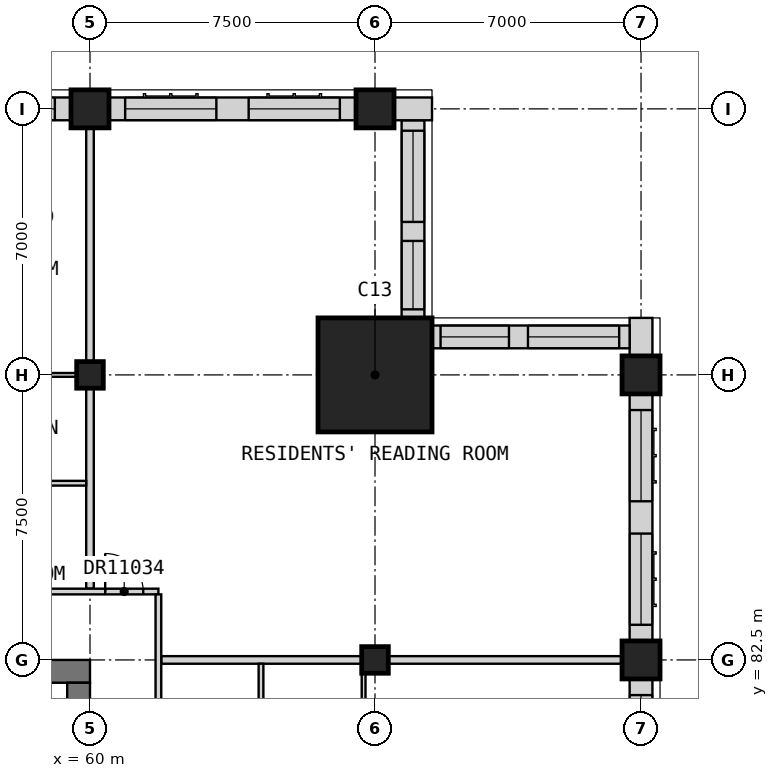
"""IFC4 building model, lengths in metres.
Left out: names, types, materials, properties, quantities, classifications, styles, units other than length and angle.
Written with IfcOpenShell. Run it as: python <this file> out.ifc"""

import sys

from ifc_helpers import new_model, si_unit, direction, frame, frame_2d, origin, origin_2d, place, context, subcontext, project, spatial, rectangle, extrude, element, fill, save


model = new_model("IFC4")
c1 = context("Model", 3, precision=1e-05, world=origin(), true_north=direction((0.0, 1.0)))
c2 = subcontext(c1, "Body", "Model", "MODEL_VIEW")
j1 = project(units=[si_unit("LENGTHUNIT", "METRE"), si_unit("PLANEANGLEUNIT", "RADIAN")], contexts=[c1])
p1 = place(None, origin())
s1 = spatial("IfcSite", under=j1, at=p1, CompositionType="ELEMENT")
p2 = place(p1, origin())
s2 = spatial("IfcBuilding", under=s1, at=p2, CompositionType="ELEMENT")
p3 = place(p2, frame((0.0, 0.0, 276.7)))
s3 = spatial("IfcBuildingStorey", under=s2, at=p3, CompositionType="ELEMENT", Elevation=276.7)
p4 = place(p3, frame((60.0, 90.0, 0.0), z_axis=(0.0, 0.0, 1.0), x_axis=(1.0, 0.0, 0.0)))
e1 = element("IfcColumn", 1, at=p4, inside=s3, PredefinedType="COLUMN", context=c2, shape_type="SweptSolid", body=[
    extrude(rectangle(XDim=0.7, YDim=0.7, at=origin_2d()), origin(), (0.0, 0.0, 1.0), 3.5),
])
p5 = place(p3, frame((60.0, 97.0, 0.0), z_axis=(0.0, 0.0, 1.0), x_axis=(1.0, 0.0, 0.0)))
e2 = element("IfcColumn", 2, at=p5, inside=s3, PredefinedType="COLUMN", context=c2, shape_type="SweptSolid", body=[
    extrude(rectangle(XDim=1.0, YDim=1.0, at=origin_2d()), origin(), (0.0, 0.0, 1.0), 3.5),
])
p6 = place(p3, frame((67.5, 82.5, 0.0), z_axis=(0.0, 0.0, 1.0), x_axis=(1.0, 0.0, 0.0)))
e3 = element("IfcColumn", 3, at=p6, inside=s3, PredefinedType="COLUMN", context=c2, shape_type="SweptSolid", body=[
    extrude(rectangle(XDim=0.7, YDim=0.7, at=origin_2d()), origin(), (0.0, 0.0, 1.0), 3.5),
])
for number, where, z_axis, x_axis in (
    (4, (67.5, 97.0, 0.0), (0.0, 0.0, 1.0), (1.0, 0.0, 0.0)),
    (5, (74.5, 82.5, 0.0), (0.0, 0.0, 1.0), (1.0, 0.0, 0.0)),
    (6, (74.5, 90.0, 0.0), (0.0, 0.0, 1.0), (1.0, 0.0, 0.0)),
):
    element("IfcColumn", number, at=place(p3, frame(where, z_axis=z_axis, x_axis=x_axis)), inside=s3, PredefinedType="COLUMN", context=c2, shape_type="SweptSolid", body=[
        extrude(rectangle(XDim=1.0, YDim=1.0, at=origin_2d()), origin(), (0.0, 0.0, 1.0), 3.5),
    ])
p7 = place(p3, frame((67.5, 90.0, 0.0), z_axis=(0.0, 0.0, 1.0), x_axis=(1.0, 0.0, 0.0)))
e7 = element("IfcColumn", 7, at=p7, inside=s3, PredefinedType="COLUMN", context=c2, shape_type="SweptSolid", body=[
    extrude(rectangle(XDim=3.0, YDim=3.0, at=origin_2d()), origin(), (0.0, 0.0, 1.0), 3.5),
])
p8 = place(p3, frame((30.0, 82.2, 0.0), z_axis=(0.0, 0.0, 1.0), x_axis=(1.0, 0.0, 0.0)))
e8 = element("IfcWall", 8, at=p8, inside=s3, PredefinedType="SHEAR", context=c2, shape_type="SweptSolid", body=[
    extrude(rectangle(XDim=30.0, YDim=0.6, at=frame_2d((15.0, 0.0))), origin(), (0.0, 0.0, 1.0), 3.5),
])
p9 = place(p3, frame((59.7, 60.6, 0.0), z_axis=(0.0, 0.0, 1.0), x_axis=(0.0, 1.0, 0.0)))
e9 = element("IfcWall", 9, at=p9, inside=s3, PredefinedType="SHEAR", context=c2, shape_type="SweptSolid", body=[
    extrude(rectangle(XDim=21.3, YDim=0.6, at=frame_2d((10.65, 0.0))), origin(), (0.0, 0.0, 1.0), 3.5),
])
p10 = place(p9, frame((14.9, 0.0, 0.0)))
e10 = element("IfcOpeningElement", 10, at=p10, cuts=e9, PredefinedType="OPENING", context=c2, shape_type="SweptSolid", body=[
    extrude(rectangle(XDim=1.8, YDim=2.1, at=frame_2d((0.9, 1.05))), frame((0.0, 0.31, 0.0), z_axis=(0.0, -1.0, 0.0), x_axis=(1.0, 0.0, 0.0)), (0.0, 0.0, 1.0), 0.62),
])
p11 = place(p3, frame((74.5, 75.5, 0.0), z_axis=(0.0, 0.0, 1.0), x_axis=(0.0, 1.0, 0.0)))
e11 = element("IfcWall", 11, at=p11, inside=s3, PredefinedType="SOLIDWALL", context=c2, shape_type="SweptSolid", body=[
    extrude(rectangle(XDim=6.5, YDim=0.6, at=frame_2d((3.25, 0.0))), origin(), (0.0, 0.0, 1.0), 2.75),
])
p12 = place(p11, frame((0.425, 0.0, 0.8)))
e12 = element("IfcOpeningElement", 12, at=p12, cuts=e11, PredefinedType="OPENING", context=c2, shape_type="SweptSolid", body=[
    extrude(rectangle(XDim=2.4, YDim=1.8, at=frame_2d((1.2, 0.9))), frame((0.0, 0.31, 0.0), z_axis=(0.0, -1.0, 0.0), x_axis=(1.0, 0.0, 0.0)), (0.0, 0.0, 1.0), 0.62),
])
p13 = place(p11, frame((3.675, 0.0, 0.8)))
e13 = element("IfcOpeningElement", 13, at=p13, cuts=e11, PredefinedType="OPENING", context=c2, shape_type="SweptSolid", body=[
    extrude(rectangle(XDim=2.4, YDim=1.8, at=frame_2d((1.2, 0.9))), frame((0.0, 0.31, 0.0), z_axis=(0.0, -1.0, 0.0), x_axis=(1.0, 0.0, 0.0)), (0.0, 0.0, 1.0), 0.62),
])
p14 = place(p3, frame((74.5, 83.0, 0.0), z_axis=(0.0, 0.0, 1.0), x_axis=(0.0, 1.0, 0.0)))
e14 = element("IfcWall", 14, at=p14, inside=s3, PredefinedType="SOLIDWALL", context=c2, shape_type="SweptSolid", body=[
    extrude(rectangle(XDim=6.5, YDim=0.6, at=frame_2d((3.25, 0.0))), origin(), (0.0, 0.0, 1.0), 2.75),
])
p15 = place(p14, frame((0.425, 0.0, 0.8)))
e15 = element("IfcOpeningElement", 15, at=p15, cuts=e14, PredefinedType="OPENING", context=c2, shape_type="SweptSolid", body=[
    extrude(rectangle(XDim=2.4, YDim=1.8, at=frame_2d((1.2, 0.9))), frame((0.0, 0.31, 0.0), z_axis=(0.0, -1.0, 0.0), x_axis=(1.0, 0.0, 0.0)), (0.0, 0.0, 1.0), 0.62),
])
p16 = place(p14, frame((3.675, 0.0, 0.8)))
e16 = element("IfcOpeningElement", 16, at=p16, cuts=e14, PredefinedType="OPENING", context=c2, shape_type="SweptSolid", body=[
    extrude(rectangle(XDim=2.4, YDim=1.8, at=frame_2d((1.2, 0.9))), frame((0.0, 0.31, 0.0), z_axis=(0.0, -1.0, 0.0), x_axis=(1.0, 0.0, 0.0)), (0.0, 0.0, 1.0), 0.62),
])
p17 = place(p3, frame((74.5, 90.5, 0.0), z_axis=(0.0, 0.0, 1.0), x_axis=(0.0, 1.0, 0.0)))
e17 = element("IfcWall", 17, at=p17, inside=s3, PredefinedType="SOLIDWALL", context=c2, shape_type="SweptSolid", body=[
    extrude(rectangle(XDim=1.0, YDim=0.6, at=frame_2d((0.5, 0.0))), origin(), (0.0, 0.0, 1.0), 3.25),
])
p18 = place(p3, frame((74.2, 91.0, 0.0), z_axis=(0.0, 0.0, 1.0), x_axis=(-1.0, 0.0, 0.0)))
e18 = element("IfcWall", 18, at=p18, inside=s3, PredefinedType="SOLIDWALL", context=c2, shape_type="SweptSolid", body=[
    extrude(rectangle(XDim=5.2, YDim=0.6, at=frame_2d((2.6, 0.0))), origin(), (0.0, 0.0, 1.0), 3.25),
])
p19 = place(p18, frame((3.175, 0.0, 0.8)))
e19 = element("IfcOpeningElement", 19, at=p19, cuts=e18, PredefinedType="OPENING", context=c2, shape_type="SweptSolid", body=[
    extrude(rectangle(XDim=1.8, YDim=1.8, at=frame_2d((0.9, 0.9))), frame((0.0, 0.31, 0.0), z_axis=(0.0, -1.0, 0.0), x_axis=(1.0, 0.0, 0.0)), (0.0, 0.0, 1.0), 0.62),
])
p20 = place(p18, frame((0.275, 0.0, 0.8)))
e20 = element("IfcOpeningElement", 20, at=p20, cuts=e18, PredefinedType="OPENING", context=c2, shape_type="SweptSolid", body=[
    extrude(rectangle(XDim=2.4, YDim=1.8, at=frame_2d((1.2, 0.9))), frame((0.0, 0.31, 0.0), z_axis=(0.0, -1.0, 0.0), x_axis=(1.0, 0.0, 0.0)), (0.0, 0.0, 1.0), 0.62),
])
p21 = place(p3, frame((68.5, 91.5, 0.0), z_axis=(0.0, 0.0, 1.0), x_axis=(0.0, 1.0, 0.0)))
e21 = element("IfcWall", 21, at=p21, inside=s3, PredefinedType="SOLIDWALL", context=c2, shape_type="SweptSolid", body=[
    extrude(rectangle(XDim=5.2, YDim=0.6, at=frame_2d((2.6, 0.0))), origin(), (0.0, 0.0, 1.0), 3.25),
])
p22 = place(p21, frame((0.225, 0.0, 0.8)))
e22 = element("IfcOpeningElement", 22, at=p22, cuts=e21, PredefinedType="OPENING", context=c2, shape_type="SweptSolid", body=[
    extrude(rectangle(XDim=1.8, YDim=1.8, at=frame_2d((0.9, 0.9))), frame((0.0, 0.31, 0.0), z_axis=(0.0, -1.0, 0.0), x_axis=(1.0, 0.0, 0.0)), (0.0, 0.0, 1.0), 0.62),
])
p23 = place(p21, frame((2.525, 0.0, 0.8)))
e23 = element("IfcOpeningElement", 23, at=p23, cuts=e21, PredefinedType="OPENING", context=c2, shape_type="SweptSolid", body=[
    extrude(rectangle(XDim=2.4, YDim=1.8, at=frame_2d((1.2, 0.9))), frame((0.0, 0.31, 0.0), z_axis=(0.0, -1.0, 0.0), x_axis=(1.0, 0.0, 0.0)), (0.0, 0.0, 1.0), 0.62),
])
p24 = place(p3, frame((69.0, 97.0, 0.0), z_axis=(0.0, 0.0, 1.0), x_axis=(-1.0, 0.0, 0.0)))
e24 = element("IfcWall", 24, at=p24, inside=s3, PredefinedType="SOLIDWALL", context=c2, shape_type="SweptSolid", body=[
    extrude(rectangle(XDim=1.0, YDim=0.6, at=frame_2d((0.5, 0.0))), origin(), (0.0, 0.0, 1.0), 3.25),
])
p25 = place(p3, frame((67.0, 97.0, 0.0), z_axis=(0.0, 0.0, 1.0), x_axis=(-1.0, 0.0, 0.0)))
e25 = element("IfcWall", 25, at=p25, inside=s3, PredefinedType="SOLIDWALL", context=c2, shape_type="SweptSolid", body=[
    extrude(rectangle(XDim=6.5, YDim=0.6, at=frame_2d((3.25, 0.0))), origin(), (0.0, 0.0, 1.0), 2.75),
])
p26 = place(p25, frame((3.675, 0.0, 0.8)))
e26 = element("IfcOpeningElement", 26, at=p26, cuts=e25, PredefinedType="OPENING", context=c2, shape_type="SweptSolid", body=[
    extrude(rectangle(XDim=2.4, YDim=1.8, at=frame_2d((1.2, 0.9))), frame((0.0, 0.31, 0.0), z_axis=(0.0, -1.0, 0.0), x_axis=(1.0, 0.0, 0.0)), (0.0, 0.0, 1.0), 0.62),
])
p27 = place(p25, frame((0.425, 0.0, 0.8)))
e27 = element("IfcOpeningElement", 27, at=p27, cuts=e25, PredefinedType="OPENING", context=c2, shape_type="SweptSolid", body=[
    extrude(rectangle(XDim=2.4, YDim=1.8, at=frame_2d((1.2, 0.9))), frame((0.0, 0.31, 0.0), z_axis=(0.0, -1.0, 0.0), x_axis=(1.0, 0.0, 0.0)), (0.0, 0.0, 1.0), 0.62),
])
p28 = place(p3, frame((59.5, 97.0, 0.0), z_axis=(0.0, 0.0, 1.0), x_axis=(-1.0, 0.0, 0.0)))
e28 = element("IfcWall", 28, at=p28, inside=s3, PredefinedType="SOLIDWALL", context=c2, shape_type="SweptSolid", body=[
    extrude(rectangle(XDim=6.5, YDim=0.6, at=frame_2d((3.25, 0.0))), origin(), (0.0, 0.0, 1.0), 2.75),
])
p29 = place(p28, frame((3.675, 0.0, 0.8)))
e29 = element("IfcOpeningElement", 29, at=p29, cuts=e28, PredefinedType="OPENING", context=c2, shape_type="SweptSolid", body=[
    extrude(rectangle(XDim=2.4, YDim=1.8, at=frame_2d((1.2, 0.9))), frame((0.0, 0.31, 0.0), z_axis=(0.0, -1.0, 0.0), x_axis=(1.0, 0.0, 0.0)), (0.0, 0.0, 1.0), 0.62),
])
p30 = place(p28, frame((0.425, 0.0, 0.8)))
e30 = element("IfcOpeningElement", 30, at=p30, cuts=e28, PredefinedType="OPENING", context=c2, shape_type="SweptSolid", body=[
    extrude(rectangle(XDim=2.4, YDim=1.8, at=frame_2d((1.2, 0.9))), frame((0.0, 0.31, 0.0), z_axis=(0.0, -1.0, 0.0), x_axis=(1.0, 0.0, 0.0)), (0.0, 0.0, 1.0), 0.62),
])
for number, where, z_axis, x_axis in (
    (31, (61.875, 82.5, 0.0), (0.0, 0.0, 1.0), (1.0, 0.0, 0.0)),
    (32, (60.0, 84.375, 0.0), (0.0, 0.0, 1.0), (0.0, 1.0, 0.0)),
):
    element("IfcWall", number, at=place(p3, frame(where, z_axis=z_axis, x_axis=x_axis)), inside=s3, PredefinedType="PARTITIONING", context=c2, shape_type="SweptSolid", body=[
        extrude(rectangle(XDim=13.125, YDim=0.2, at=frame_2d((6.562, 0.0))), origin(), (0.0, 0.0, 1.0), 3.25),
    ])
p31 = place(p3, frame((33.75, 84.3, 0.0), z_axis=(0.0, 0.0, 1.0), x_axis=(1.0, 0.0, 0.0)))
e33 = element("IfcWall", 33, at=p31, inside=s3, PredefinedType="PARTITIONING", context=c2, shape_type="SweptSolid", body=[
    extrude(rectangle(XDim=28.05, YDim=0.15, at=frame_2d((14.025, 0.0))), origin(), (0.0, 0.0, 1.0), 3.25),
])
p32 = place(p31, frame((1.375, 0.0, 0.0)))
e34 = element("IfcOpeningElement", 34, at=p32, cuts=e33, PredefinedType="OPENING", context=c2, shape_type="SweptSolid", body=[
    extrude(rectangle(XDim=1.0, YDim=2.1, at=frame_2d((0.5, 1.05))), frame((0.0, 0.085, 0.0), z_axis=(0.0, -1.0, 0.0), x_axis=(1.0, 0.0, 0.0)), (0.0, 0.0, 1.0), 0.17),
])
p33 = place(p31, frame((8.925, 0.0, 0.0)))
e35 = element("IfcOpeningElement", 35, at=p33, cuts=e33, PredefinedType="OPENING", context=c2, shape_type="SweptSolid", body=[
    extrude(rectangle(XDim=0.9, YDim=2.1, at=frame_2d((0.45, 1.05))), frame((0.0, 0.085, 0.0), z_axis=(0.0, -1.0, 0.0), x_axis=(1.0, 0.0, 0.0)), (0.0, 0.0, 1.0), 0.17),
])
p34 = place(p31, frame((20.175, 0.0, 0.0)))
e36 = element("IfcOpeningElement", 36, at=p34, cuts=e33, PredefinedType="OPENING", context=c2, shape_type="SweptSolid", body=[
    extrude(rectangle(XDim=0.9, YDim=2.1, at=frame_2d((0.45, 1.05))), frame((0.0, 0.085, 0.0), z_axis=(0.0, -1.0, 0.0), x_axis=(1.0, 0.0, 0.0)), (0.0, 0.0, 1.0), 0.17),
])
p35 = place(p31, frame((26.65, 0.0, 0.0)))
e37 = element("IfcOpeningElement", 37, at=p35, cuts=e33, PredefinedType="OPENING", context=c2, shape_type="SweptSolid", body=[
    extrude(rectangle(XDim=1.0, YDim=2.1, at=frame_2d((0.5, 1.05))), frame((0.0, 0.085, 0.0), z_axis=(0.0, -1.0, 0.0), x_axis=(1.0, 0.0, 0.0)), (0.0, 0.0, 1.0), 0.17),
])
p36 = place(p3, frame((61.8, 58.275, 0.0), z_axis=(0.0, 0.0, 1.0), x_axis=(0.0, 1.0, 0.0)))
e38 = element("IfcWall", 38, at=p36, inside=s3, PredefinedType="PARTITIONING", context=c2, shape_type="SweptSolid", body=[
    extrude(rectangle(XDim=25.95, YDim=0.15, at=frame_2d((12.975, 0.0))), origin(), (0.0, 0.0, 1.0), 3.25),
])
p37 = place(p36, frame((3.15, 0.0, 0.0)))
e39 = element("IfcOpeningElement", 39, at=p37, cuts=e38, PredefinedType="OPENING", context=c2, shape_type="SweptSolid", body=[
    extrude(rectangle(XDim=0.9, YDim=2.1, at=frame_2d((0.45, 1.05))), frame((0.0, 0.085, 0.0), z_axis=(0.0, -1.0, 0.0), x_axis=(1.0, 0.0, 0.0)), (0.0, 0.0, 1.0), 0.17),
])
p38 = place(p36, frame((10.65, 0.0, 0.0)))
e40 = element("IfcOpeningElement", 40, at=p38, cuts=e38, PredefinedType="OPENING", context=c2, shape_type="SweptSolid", body=[
    extrude(rectangle(XDim=0.9, YDim=2.1, at=frame_2d((0.45, 1.05))), frame((0.0, 0.085, 0.0), z_axis=(0.0, -1.0, 0.0), x_axis=(1.0, 0.0, 0.0)), (0.0, 0.0, 1.0), 0.17),
])
p39 = place(p36, frame((18.15, 0.0, 0.0)))
e41 = element("IfcOpeningElement", 41, at=p39, cuts=e38, PredefinedType="OPENING", context=c2, shape_type="SweptSolid", body=[
    extrude(rectangle(XDim=0.9, YDim=2.1, at=frame_2d((0.45, 1.05))), frame((0.0, 0.085, 0.0), z_axis=(0.0, -1.0, 0.0), x_axis=(1.0, 0.0, 0.0)), (0.0, 0.0, 1.0), 0.17),
])
p40 = place(p3, frame((37.6, 90.0, 0.0), z_axis=(0.0, 0.0, 1.0), x_axis=(1.0, 0.0, 0.0)))
e42 = element("IfcWall", 42, at=p40, inside=s3, PredefinedType="PARTITIONING", context=c2, shape_type="SweptSolid", body=[
    extrude(rectangle(XDim=22.3, YDim=0.1, at=frame_2d((11.15, 0.0))), origin(), (0.0, 0.0, 1.0), 3.25),
])
p41 = place(p40, frame((1.475, 0.0, 0.0)))
e43 = element("IfcOpeningElement", 43, at=p41, cuts=e42, PredefinedType="OPENING", context=c2, shape_type="SweptSolid", body=[
    extrude(rectangle(XDim=0.9, YDim=2.1, at=frame_2d((0.45, 1.05))), frame((0.0, 0.06, 0.0), z_axis=(0.0, -1.0, 0.0), x_axis=(1.0, 0.0, 0.0)), (0.0, 0.0, 1.0), 0.12),
])
p42 = place(p40, frame((5.075, 0.0, 0.0)))
e44 = element("IfcOpeningElement", 44, at=p42, cuts=e42, PredefinedType="OPENING", context=c2, shape_type="SweptSolid", body=[
    extrude(rectangle(XDim=0.9, YDim=2.1, at=frame_2d((0.45, 1.05))), frame((0.0, 0.06, 0.0), z_axis=(0.0, -1.0, 0.0), x_axis=(1.0, 0.0, 0.0)), (0.0, 0.0, 1.0), 0.12),
])
p43 = place(p40, frame((12.575, 0.0, 0.0)))
e45 = element("IfcOpeningElement", 45, at=p43, cuts=e42, PredefinedType="OPENING", context=c2, shape_type="SweptSolid", body=[
    extrude(rectangle(XDim=0.9, YDim=2.1, at=frame_2d((0.45, 1.05))), frame((0.0, 0.06, 0.0), z_axis=(0.0, -1.0, 0.0), x_axis=(1.0, 0.0, 0.0)), (0.0, 0.0, 1.0), 0.12),
])
p44 = place(p40, frame((16.325, 0.0, 0.0)))
e46 = element("IfcOpeningElement", 46, at=p44, cuts=e42, PredefinedType="OPENING", context=c2, shape_type="SweptSolid", body=[
    extrude(rectangle(XDim=0.9, YDim=2.1, at=frame_2d((0.45, 1.05))), frame((0.0, 0.06, 0.0), z_axis=(0.0, -1.0, 0.0), x_axis=(1.0, 0.0, 0.0)), (0.0, 0.0, 1.0), 0.12),
])
p45 = place(p3, frame((67.2, 60.1, 0.0), z_axis=(0.0, 0.0, 1.0), x_axis=(0.0, 1.0, 0.0)))
e47 = element("IfcWall", 47, at=p45, inside=s3, PredefinedType="PARTITIONING", context=c2, shape_type="SweptSolid", body=[
    extrude(rectangle(XDim=22.3, YDim=0.1, at=frame_2d((11.15, 0.0))), origin(), (0.0, 0.0, 1.0), 3.25),
])
p46 = place(p45, frame((1.325, 0.0, 0.0)))
e48 = element("IfcOpeningElement", 48, at=p46, cuts=e47, PredefinedType="OPENING", context=c2, shape_type="SweptSolid", body=[
    extrude(rectangle(XDim=0.9, YDim=2.1, at=frame_2d((0.45, 1.05))), frame((0.0, 0.06, 0.0), z_axis=(0.0, -1.0, 0.0), x_axis=(1.0, 0.0, 0.0)), (0.0, 0.0, 1.0), 0.12),
])
p47 = place(p45, frame((8.825, 0.0, 0.0)))
e49 = element("IfcOpeningElement", 49, at=p47, cuts=e47, PredefinedType="OPENING", context=c2, shape_type="SweptSolid", body=[
    extrude(rectangle(XDim=0.9, YDim=2.1, at=frame_2d((0.45, 1.05))), frame((0.0, 0.06, 0.0), z_axis=(0.0, -1.0, 0.0), x_axis=(1.0, 0.0, 0.0)), (0.0, 0.0, 1.0), 0.12),
])
p48 = place(p45, frame((16.325, 0.0, 0.0)))
e50 = element("IfcOpeningElement", 50, at=p48, cuts=e47, PredefinedType="OPENING", context=c2, shape_type="SweptSolid", body=[
    extrude(rectangle(XDim=0.9, YDim=2.1, at=frame_2d((0.45, 1.05))), frame((0.0, 0.06, 0.0), z_axis=(0.0, -1.0, 0.0), x_axis=(1.0, 0.0, 0.0)), (0.0, 0.0, 1.0), 0.12),
])
p49 = place(p3, frame((56.25, 87.15, 0.0), z_axis=(0.0, 0.0, 1.0), x_axis=(1.0, 0.0, 0.0)))
e51 = element("IfcWall", 51, at=p49, inside=s3, PredefinedType="PARTITIONING", context=c2, shape_type="SweptSolid", body=[
    extrude(rectangle(XDim=3.65, YDim=0.125, at=frame_2d((1.825, 0.0))), origin(), (0.0, 0.0, 1.0), 3.25),
])
p50 = place(p3, frame((64.5, 78.812, 0.0), z_axis=(0.0, 0.0, 1.0), x_axis=(0.0, 1.0, 0.0)))
e52 = element("IfcWall", 52, at=p50, inside=s3, PredefinedType="PARTITIONING", context=c2, shape_type="SweptSolid", body=[
    extrude(rectangle(XDim=3.587, YDim=0.125, at=frame_2d((1.794, 0.0))), origin(), (0.0, 0.0, 1.0), 3.25),
])
p51 = place(p13, origin())
e53 = element("IfcWindow", 53, at=p51, inside=s3, PartitioningType="SINGLE_PANEL", PredefinedType="WINDOW", context=c2, shape_type="SweptSolid", body=[
    extrude(rectangle(XDim=2.4, YDim=1.8, at=frame_2d((1.2, 0.9))), frame((0.0, -0.07, 0.0), z_axis=(0.0, -1.0, 0.0), x_axis=(1.0, 0.0, 0.0)), (0.0, 0.0, 1.0), 0.06),
])
fill(e13, e53)
p52 = place(p15, origin())
e54 = element("IfcWindow", 54, at=p52, inside=s3, PartitioningType="SINGLE_PANEL", PredefinedType="WINDOW", context=c2, shape_type="SweptSolid", body=[
    extrude(rectangle(XDim=2.4, YDim=1.8, at=frame_2d((1.2, 0.9))), frame((0.0, -0.07, 0.0), z_axis=(0.0, -1.0, 0.0), x_axis=(1.0, 0.0, 0.0)), (0.0, 0.0, 1.0), 0.06),
])
fill(e15, e54)
p53 = place(p16, origin())
e55 = element("IfcWindow", 55, at=p53, inside=s3, PartitioningType="SINGLE_PANEL", PredefinedType="WINDOW", context=c2, shape_type="SweptSolid", body=[
    extrude(rectangle(XDim=2.4, YDim=1.8, at=frame_2d((1.2, 0.9))), frame((0.0, -0.07, 0.0), z_axis=(0.0, -1.0, 0.0), x_axis=(1.0, 0.0, 0.0)), (0.0, 0.0, 1.0), 0.06),
])
fill(e16, e55)
p54 = place(p19, origin())
e56 = element("IfcWindow", 56, at=p54, inside=s3, PartitioningType="SINGLE_PANEL", PredefinedType="WINDOW", context=c2, shape_type="SweptSolid", body=[
    extrude(rectangle(XDim=1.8, YDim=1.8, at=frame_2d((0.9, 0.9))), frame((0.0, -0.07, 0.0), z_axis=(0.0, -1.0, 0.0), x_axis=(1.0, 0.0, 0.0)), (0.0, 0.0, 1.0), 0.06),
])
fill(e19, e56)
p55 = place(p20, origin())
e57 = element("IfcWindow", 57, at=p55, inside=s3, PartitioningType="SINGLE_PANEL", PredefinedType="WINDOW", context=c2, shape_type="SweptSolid", body=[
    extrude(rectangle(XDim=2.4, YDim=1.8, at=frame_2d((1.2, 0.9))), frame((0.0, -0.07, 0.0), z_axis=(0.0, -1.0, 0.0), x_axis=(1.0, 0.0, 0.0)), (0.0, 0.0, 1.0), 0.06),
])
fill(e20, e57)
p56 = place(p22, origin())
e58 = element("IfcWindow", 58, at=p56, inside=s3, PartitioningType="SINGLE_PANEL", PredefinedType="WINDOW", context=c2, shape_type="SweptSolid", body=[
    extrude(rectangle(XDim=1.8, YDim=1.8, at=frame_2d((0.9, 0.9))), frame((0.0, -0.07, 0.0), z_axis=(0.0, -1.0, 0.0), x_axis=(1.0, 0.0, 0.0)), (0.0, 0.0, 1.0), 0.06),
])
fill(e22, e58)
p57 = place(p23, origin())
e59 = element("IfcWindow", 59, at=p57, inside=s3, PartitioningType="SINGLE_PANEL", PredefinedType="WINDOW", context=c2, shape_type="SweptSolid", body=[
    extrude(rectangle(XDim=2.4, YDim=1.8, at=frame_2d((1.2, 0.9))), frame((0.0, -0.07, 0.0), z_axis=(0.0, -1.0, 0.0), x_axis=(1.0, 0.0, 0.0)), (0.0, 0.0, 1.0), 0.06),
])
fill(e23, e59)
p58 = place(p26, origin())
e60 = element("IfcWindow", 60, at=p58, inside=s3, PartitioningType="SINGLE_PANEL", PredefinedType="WINDOW", context=c2, shape_type="SweptSolid", body=[
    extrude(rectangle(XDim=2.4, YDim=1.8, at=frame_2d((1.2, 0.9))), frame((0.0, -0.07, 0.0), z_axis=(0.0, -1.0, 0.0), x_axis=(1.0, 0.0, 0.0)), (0.0, 0.0, 1.0), 0.06),
])
fill(e26, e60)
p59 = place(p27, origin())
e61 = element("IfcWindow", 61, at=p59, inside=s3, PartitioningType="SINGLE_PANEL", PredefinedType="WINDOW", context=c2, shape_type="SweptSolid", body=[
    extrude(rectangle(XDim=2.4, YDim=1.8, at=frame_2d((1.2, 0.9))), frame((0.0, -0.07, 0.0), z_axis=(0.0, -1.0, 0.0), x_axis=(1.0, 0.0, 0.0)), (0.0, 0.0, 1.0), 0.06),
])
fill(e27, e61)
p60 = place(p30, origin())
e62 = element("IfcWindow", 62, at=p60, inside=s3, PartitioningType="SINGLE_PANEL", PredefinedType="WINDOW", context=c2, shape_type="SweptSolid", body=[
    extrude(rectangle(XDim=2.4, YDim=1.8, at=frame_2d((1.2, 0.9))), frame((0.0, -0.07, 0.0), z_axis=(0.0, -1.0, 0.0), x_axis=(1.0, 0.0, 0.0)), (0.0, 0.0, 1.0), 0.06),
])
fill(e30, e62)
p61 = place(p35, origin())
e63 = element("IfcDoor", 63, at=p61, inside=s3, OperationType="SINGLE_SWING_LEFT", PredefinedType="DOOR", context=c2, shape_type="SweptSolid", body=[
    extrude(rectangle(XDim=1.0, YDim=2.1, at=frame_2d((0.5, 1.05))), frame((0.0, 0.025, 0.0), z_axis=(0.0, -1.0, 0.0), x_axis=(1.0, 0.0, 0.0)), (0.0, 0.0, 1.0), 0.05),
])
fill(e37, e63)
save(model, sys.argv[1])
